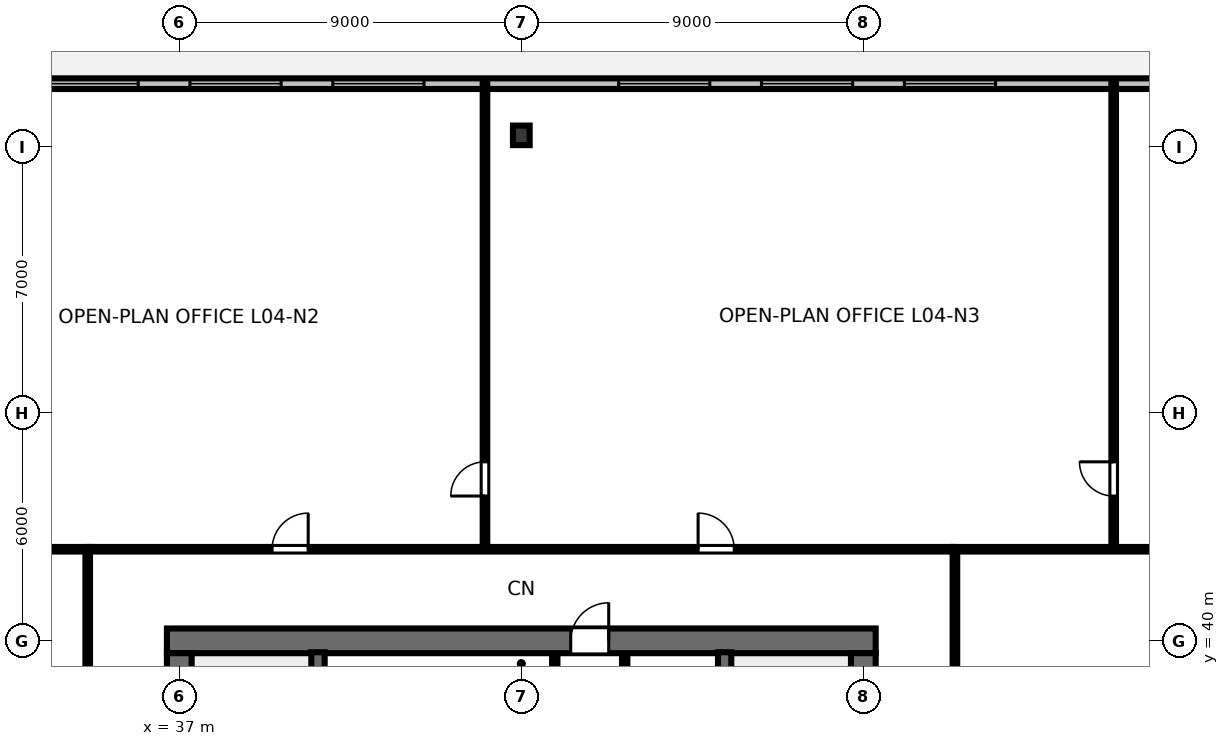
"""IFC4 building model, lengths in metres.
Left out: names, types, materials, properties, quantities, classifications, styles, units other than length and angle.
Written with IfcOpenShell. Run it as: python <this file> out.ifc"""

import sys

from ifc_helpers import new_model, si_unit, direction, frame, frame_2d, origin, origin_2d, place, context, subcontext, project, spatial, rectangle, i_section, extrude, element, fill, save


model = new_model("IFC4")
c1 = context("Model", 3, precision=1e-05, world=origin(), true_north=direction((0.0, 1.0)))
c2 = subcontext(c1, "Body", "Model", "MODEL_VIEW")
j1 = project(units=[si_unit("LENGTHUNIT", "METRE"), si_unit("PLANEANGLEUNIT", "RADIAN")], contexts=[c1])
p1 = place(None, origin())
s1 = spatial("IfcSite", under=j1, at=p1, CompositionType="ELEMENT")
p2 = place(p1, origin())
s2 = spatial("IfcBuilding", under=s1, at=p2, CompositionType="ELEMENT")
p3 = place(p2, frame((0.0, 0.0, 18.5)))
s3 = spatial("IfcBuildingStorey", under=s2, at=p3, CompositionType="ELEMENT", Elevation=18.5)
p4 = place(p3, frame((36.675, 40.0, 0.0), z_axis=(0.0, 0.0, 1.0), x_axis=(1.0, 0.0, 0.0)))
e1 = element("IfcWall", 1, at=p4, inside=s3, PredefinedType="SHEAR", context=c2, shape_type="SweptSolid", body=[
    extrude(rectangle(XDim=18.65, YDim=0.65, at=frame_2d((9.325, 0.0))), origin(), (0.0, 0.0, 1.0), 4.05),
])
p5 = place(p4, frame((10.625, 0.0, 0.0)))
e2 = element("IfcOpeningElement", 2, at=p5, cuts=e1, PredefinedType="OPENING", context=c2, shape_type="SweptSolid", body=[
    extrude(rectangle(XDim=1.0, YDim=2.15, at=frame_2d((0.5, 1.075))), frame((0.0, 0.335, 0.0), z_axis=(0.0, -1.0, 0.0), x_axis=(1.0, 0.0, 0.0)), (0.0, 0.0, 1.0), 0.67),
])
p6 = place(p3, frame((37.0, 24.325, 0.0), z_axis=(0.0, 0.0, 1.0), x_axis=(0.0, 1.0, 0.0)))
e3 = element("IfcWall", 3, at=p6, inside=s3, PredefinedType="SHEAR", context=c2, shape_type="SweptSolid", body=[
    extrude(rectangle(XDim=15.35, YDim=0.65, at=frame_2d((7.675, 0.0))), origin(), (0.0, 0.0, 1.0), 4.05),
])
p7 = place(p6, frame((5.2, 0.0, 0.0)))
e4 = element("IfcOpeningElement", 4, at=p7, cuts=e3, PredefinedType="OPENING", context=c2, shape_type="SweptSolid", body=[
    extrude(rectangle(XDim=1.15, YDim=2.15, at=frame_2d((0.575, 1.075))), frame((0.0, 0.335, 0.0), z_axis=(0.0, -1.0, 0.0), x_axis=(1.0, 0.0, 0.0)), (0.0, 0.0, 1.0), 0.67),
])
p8 = place(p3, frame((55.0, 24.325, 0.0), z_axis=(0.0, 0.0, 1.0), x_axis=(0.0, 1.0, 0.0)))
e5 = element("IfcWall", 5, at=p8, inside=s3, PredefinedType="SHEAR", context=c2, shape_type="SweptSolid", body=[
    extrude(rectangle(XDim=15.35, YDim=0.65, at=frame_2d((7.675, 0.0))), origin(), (0.0, 0.0, 1.0), 4.05),
])
p9 = place(p8, frame((5.2, 0.0, 0.0)))
e6 = element("IfcOpeningElement", 6, at=p9, cuts=e5, PredefinedType="OPENING", context=c2, shape_type="SweptSolid", body=[
    extrude(rectangle(XDim=1.15, YDim=2.15, at=frame_2d((0.575, 1.075))), frame((0.0, 0.335, 0.0), z_axis=(0.0, -1.0, 0.0), x_axis=(1.0, 0.0, 0.0)), (0.0, 0.0, 1.0), 0.67),
])
p10 = place(p3, frame((46.0, 53.3, 0.0), z_axis=(0.0, 0.0, 1.0), x_axis=(1.0, 0.0, 0.0)))
e7 = element("IfcColumn", 7, at=p10, inside=s3, PredefinedType="COLUMN", context=c2, shape_type="SweptSolid", body=[
    extrude(i_section(OverallWidth=0.439, OverallDepth=0.514, WebThickness=0.06, FlangeThickness=0.097, FilletRadius=0.025, at=origin_2d()), origin(), (0.0, 0.0, 1.0), 4.048),
])
p11 = place(p3, frame((71.54, 54.66, 0.0), z_axis=(0.0, 0.0, 1.0), x_axis=(-1.0, 0.0, 0.0)))
e8 = element("IfcWall", 8, at=p11, inside=s3, PredefinedType="STANDARD", context=c2, shape_type="SweptSolid", body=[
    extrude(rectangle(XDim=51.08, YDim=0.28, at=frame_2d((25.54, 0.0))), origin(), (0.0, 0.0, 1.0), 4.05),
])
p12 = place(p11, frame((5.54, 0.0, 0.85)))
e9 = element("IfcOpeningElement", 9, at=p12, cuts=e8, PredefinedType="OPENING", context=c2, shape_type="SweptSolid", body=[
    extrude(rectangle(XDim=2.4, YDim=2.4, at=frame_2d((1.2, 1.2))), frame((0.0, 0.15, 0.0), z_axis=(0.0, -1.0, 0.0), x_axis=(1.0, 0.0, 0.0)), (0.0, 0.0, 1.0), 0.3),
])
p13 = place(p11, frame((13.06, 0.0, 0.85)))
e10 = element("IfcOpeningElement", 10, at=p13, cuts=e8, PredefinedType="OPENING", context=c2, shape_type="SweptSolid", body=[
    extrude(rectangle(XDim=2.4, YDim=2.4, at=frame_2d((1.2, 1.2))), frame((0.0, 0.15, 0.0), z_axis=(0.0, -1.0, 0.0), x_axis=(1.0, 0.0, 0.0)), (0.0, 0.0, 1.0), 0.3),
])
p14 = place(p11, frame((16.82, 0.0, 0.85)))
e11 = element("IfcOpeningElement", 11, at=p14, cuts=e8, PredefinedType="OPENING", context=c2, shape_type="SweptSolid", body=[
    extrude(rectangle(XDim=2.4, YDim=2.4, at=frame_2d((1.2, 1.2))), frame((0.0, 0.15, 0.0), z_axis=(0.0, -1.0, 0.0), x_axis=(1.0, 0.0, 0.0)), (0.0, 0.0, 1.0), 0.3),
])
p15 = place(p11, frame((20.58, 0.0, 0.85)))
e12 = element("IfcOpeningElement", 12, at=p15, cuts=e8, PredefinedType="OPENING", context=c2, shape_type="SweptSolid", body=[
    extrude(rectangle(XDim=2.4, YDim=2.4, at=frame_2d((1.2, 1.2))), frame((0.0, 0.15, 0.0), z_axis=(0.0, -1.0, 0.0), x_axis=(1.0, 0.0, 0.0)), (0.0, 0.0, 1.0), 0.3),
])
p16 = place(p11, frame((28.1, 0.0, 0.85)))
e13 = element("IfcOpeningElement", 13, at=p16, cuts=e8, PredefinedType="OPENING", context=c2, shape_type="SweptSolid", body=[
    extrude(rectangle(XDim=2.4, YDim=2.4, at=frame_2d((1.2, 1.2))), frame((0.0, 0.15, 0.0), z_axis=(0.0, -1.0, 0.0), x_axis=(1.0, 0.0, 0.0)), (0.0, 0.0, 1.0), 0.3),
])
p17 = place(p11, frame((31.86, 0.0, 0.85)))
e14 = element("IfcOpeningElement", 14, at=p17, cuts=e8, PredefinedType="OPENING", context=c2, shape_type="SweptSolid", body=[
    extrude(rectangle(XDim=2.4, YDim=2.4, at=frame_2d((1.2, 1.2))), frame((0.0, 0.15, 0.0), z_axis=(0.0, -1.0, 0.0), x_axis=(1.0, 0.0, 0.0)), (0.0, 0.0, 1.0), 0.3),
])
p18 = place(p11, frame((35.62, 0.0, 0.85)))
e15 = element("IfcOpeningElement", 15, at=p18, cuts=e8, PredefinedType="OPENING", context=c2, shape_type="SweptSolid", body=[
    extrude(rectangle(XDim=2.4, YDim=2.4, at=frame_2d((1.2, 1.2))), frame((0.0, 0.15, 0.0), z_axis=(0.0, -1.0, 0.0), x_axis=(1.0, 0.0, 0.0)), (0.0, 0.0, 1.0), 0.3),
])
p19 = place(p11, frame((43.14, 0.0, 0.85)))
e16 = element("IfcOpeningElement", 16, at=p19, cuts=e8, PredefinedType="OPENING", context=c2, shape_type="SweptSolid", body=[
    extrude(rectangle(XDim=2.4, YDim=2.4, at=frame_2d((1.2, 1.2))), frame((0.0, 0.15, 0.0), z_axis=(0.0, -1.0, 0.0), x_axis=(1.0, 0.0, 0.0)), (0.0, 0.0, 1.0), 0.3),
])
for number, where, z_axis, x_axis in (
    (17, (40.65, 32.0, 0.0), (0.0, 0.0, 1.0), (0.0, 1.0, 0.0)),
    (18, (51.35, 32.0, 0.0), (0.0, 0.0, 1.0), (0.0, 1.0, 0.0)),
):
    element("IfcWall", number, at=place(p3, frame(where, z_axis=z_axis, x_axis=x_axis)), inside=s3, PredefinedType="SHEAR", context=c2, shape_type="SweptSolid", body=[
        extrude(rectangle(XDim=7.7, YDim=0.35, at=frame_2d((3.85, 0.0))), origin(), (0.0, 0.0, 1.0), 4.5),
    ])
p20 = place(p3, frame((46.88, 32.05, 0.0), z_axis=(0.0, 0.0, 1.0), x_axis=(0.0, 1.0, 0.0)))
e19 = element("IfcWall", 19, at=p20, inside=s3, PredefinedType="PARTITIONING", context=c2, shape_type="SweptSolid", body=[
    extrude(rectangle(XDim=7.6, YDim=0.14, at=frame_2d((3.8, 0.0))), origin(), (0.0, 0.0, 1.0), 4.05),
])
p21 = place(p20, frame((3.4, 0.0, 0.0)))
e20 = element("IfcOpeningElement", 20, at=p21, cuts=e19, PredefinedType="OPENING", context=c2, shape_type="SweptSolid", body=[
    extrude(rectangle(XDim=0.95, YDim=2.15, at=frame_2d((0.475, 1.075))), frame((0.0, 0.08, 0.0), z_axis=(0.0, -1.0, 0.0), x_axis=(1.0, 0.0, 0.0)), (0.0, 0.0, 1.0), 0.16),
])
p22 = place(p3, frame((48.72, 32.05, 0.0), z_axis=(0.0, 0.0, 1.0), x_axis=(0.0, 1.0, 0.0)))
e21 = element("IfcWall", 21, at=p22, inside=s3, PredefinedType="PARTITIONING", context=c2, shape_type="SweptSolid", body=[
    extrude(rectangle(XDim=7.6, YDim=0.14, at=frame_2d((3.8, 0.0))), origin(), (0.0, 0.0, 1.0), 4.05),
])
p23 = place(p22, frame((0.8, 0.0, 0.0)))
e22 = element("IfcOpeningElement", 22, at=p23, cuts=e21, PredefinedType="OPENING", context=c2, shape_type="SweptSolid", body=[
    extrude(rectangle(XDim=0.9, YDim=2.15, at=frame_2d((0.45, 1.075))), frame((0.0, 0.08, 0.0), z_axis=(0.0, -1.0, 0.0), x_axis=(1.0, 0.0, 0.0)), (0.0, 0.0, 1.0), 0.16),
])
p24 = place(p22, frame((3.35, 0.0, 0.0)))
e23 = element("IfcOpeningElement", 23, at=p24, cuts=e21, PredefinedType="OPENING", context=c2, shape_type="SweptSolid", body=[
    extrude(rectangle(XDim=0.9, YDim=2.15, at=frame_2d((0.45, 1.075))), frame((0.0, 0.08, 0.0), z_axis=(0.0, -1.0, 0.0), x_axis=(1.0, 0.0, 0.0)), (0.0, 0.0, 1.0), 0.16),
])
p25 = place(p22, frame((5.9, 0.0, 0.0)))
e24 = element("IfcOpeningElement", 24, at=p25, cuts=e21, PredefinedType="OPENING", context=c2, shape_type="SweptSolid", body=[
    extrude(rectangle(XDim=0.92, YDim=2.15, at=frame_2d((0.46, 1.075))), frame((0.0, 0.08, 0.0), z_axis=(0.0, -1.0, 0.0), x_axis=(1.0, 0.0, 0.0)), (0.0, 0.0, 1.0), 0.16),
])
p26 = place(p3, frame((45.044, 42.41, 0.0), z_axis=(0.0, 0.0, 1.0), x_axis=(0.0, 1.0, 0.0)))
e25 = element("IfcWall", 25, at=p26, inside=s3, PredefinedType="PARTITIONING", context=c2, shape_type="SweptSolid", body=[
    extrude(rectangle(XDim=12.25, YDim=0.12, at=frame_2d((6.125, 0.0))), origin(), (0.0, 0.0, 1.0), 2.89),
])
p27 = place(p26, frame((1.4, 0.0, 0.0)))
e26 = element("IfcOpeningElement", 26, at=p27, cuts=e25, PredefinedType="OPENING", context=c2, shape_type="SweptSolid", body=[
    extrude(rectangle(XDim=0.9, YDim=2.15, at=frame_2d((0.45, 1.075))), frame((0.0, 0.07, 0.0), z_axis=(0.0, -1.0, 0.0), x_axis=(1.0, 0.0, 0.0)), (0.0, 0.0, 1.0), 0.14),
])
p28 = place(p3, frame((61.588, 42.41, 0.0), z_axis=(0.0, 0.0, 1.0), x_axis=(0.0, 1.0, 0.0)))
e27 = element("IfcWall", 27, at=p28, inside=s3, PredefinedType="PARTITIONING", context=c2, shape_type="SweptSolid", body=[
    extrude(rectangle(XDim=12.25, YDim=0.12, at=frame_2d((6.125, 0.0))), origin(), (0.0, 0.0, 1.0), 2.89),
])
p29 = place(p28, frame((1.4, 0.0, 0.0)))
e28 = element("IfcOpeningElement", 28, at=p29, cuts=e27, PredefinedType="OPENING", context=c2, shape_type="SweptSolid", body=[
    extrude(rectangle(XDim=0.9, YDim=2.15, at=frame_2d((0.45, 1.075))), frame((0.0, 0.07, 0.0), z_axis=(0.0, -1.0, 0.0), x_axis=(1.0, 0.0, 0.0)), (0.0, 0.0, 1.0), 0.14),
])
p30 = place(p3, frame((34.65, 42.41, 0.0), z_axis=(0.0, 0.0, 1.0), x_axis=(1.0, 0.0, 0.0)))
e29 = element("IfcWall", 29, at=p30, inside=s3, PredefinedType="PARTITIONING", context=c2, shape_type="SweptSolid", body=[
    extrude(rectangle(XDim=22.7, YDim=0.12, at=frame_2d((11.35, 0.0))), origin(), (0.0, 0.0, 1.0), 2.89),
])
p31 = place(p30, frame((4.792, 0.0, 0.0)))
e30 = element("IfcOpeningElement", 30, at=p31, cuts=e29, PredefinedType="OPENING", context=c2, shape_type="SweptSolid", body=[
    extrude(rectangle(XDim=0.95, YDim=2.15, at=frame_2d((0.475, 1.075))), frame((0.0, 0.07, 0.0), z_axis=(0.0, -1.0, 0.0), x_axis=(1.0, 0.0, 0.0)), (0.0, 0.0, 1.0), 0.14),
])
p32 = place(p30, frame((16.002, 0.0, 0.0)))
e31 = element("IfcOpeningElement", 31, at=p32, cuts=e29, PredefinedType="OPENING", context=c2, shape_type="SweptSolid", body=[
    extrude(rectangle(XDim=0.95, YDim=2.15, at=frame_2d((0.475, 1.075))), frame((0.0, 0.07, 0.0), z_axis=(0.0, -1.0, 0.0), x_axis=(1.0, 0.0, 0.0)), (0.0, 0.0, 1.0), 0.14),
])
p33 = place(p3, frame((34.59, 21.65, 0.0), z_axis=(0.0, 0.0, 1.0), x_axis=(0.0, 1.0, 0.0)))
e32 = element("IfcWall", 32, at=p33, inside=s3, PredefinedType="PARTITIONING", context=c2, shape_type="SweptSolid", body=[
    extrude(rectangle(XDim=20.7, YDim=0.12, at=frame_2d((10.35, 0.0))), origin(), (0.0, 0.0, 1.0), 2.89),
])
p34 = place(p33, frame((2.105, 0.0, 0.0)))
e33 = element("IfcOpeningElement", 33, at=p34, cuts=e32, PredefinedType="OPENING", context=c2, shape_type="SweptSolid", body=[
    extrude(rectangle(XDim=0.95, YDim=2.15, at=frame_2d((0.475, 1.075))), frame((0.0, 0.07, 0.0), z_axis=(0.0, -1.0, 0.0), x_axis=(1.0, 0.0, 0.0)), (0.0, 0.0, 1.0), 0.14),
])
p35 = place(p33, frame((7.369, 0.0, 0.0)))
e34 = element("IfcOpeningElement", 34, at=p35, cuts=e32, PredefinedType="OPENING", context=c2, shape_type="SweptSolid", body=[
    extrude(rectangle(XDim=0.95, YDim=2.15, at=frame_2d((0.475, 1.075))), frame((0.0, 0.07, 0.0), z_axis=(0.0, -1.0, 0.0), x_axis=(1.0, 0.0, 0.0)), (0.0, 0.0, 1.0), 0.14),
])
p36 = place(p33, frame((15.139, 0.0, 0.0)))
e35 = element("IfcOpeningElement", 35, at=p36, cuts=e32, PredefinedType="OPENING", context=c2, shape_type="SweptSolid", body=[
    extrude(rectangle(XDim=0.95, YDim=2.15, at=frame_2d((0.475, 1.075))), frame((0.0, 0.07, 0.0), z_axis=(0.0, -1.0, 0.0), x_axis=(1.0, 0.0, 0.0)), (0.0, 0.0, 1.0), 0.14),
])
p37 = place(p3, frame((57.41, 21.65, 0.0), z_axis=(0.0, 0.0, 1.0), x_axis=(0.0, 1.0, 0.0)))
e36 = element("IfcWall", 36, at=p37, inside=s3, PredefinedType="PARTITIONING", context=c2, shape_type="SweptSolid", body=[
    extrude(rectangle(XDim=20.7, YDim=0.12, at=frame_2d((10.35, 0.0))), origin(), (0.0, 0.0, 1.0), 2.89),
])
p38 = place(p37, frame((9.875, 0.0, 0.0)))
e37 = element("IfcOpeningElement", 37, at=p38, cuts=e36, PredefinedType="OPENING", context=c2, shape_type="SweptSolid", body=[
    extrude(rectangle(XDim=0.95, YDim=2.15, at=frame_2d((0.475, 1.075))), frame((0.0, 0.07, 0.0), z_axis=(0.0, -1.0, 0.0), x_axis=(1.0, 0.0, 0.0)), (0.0, 0.0, 1.0), 0.14),
])
for number, where, z_axis, x_axis in (
    (38, (34.65, 42.41, 0.0), (0.0, 0.0, 1.0), (-1.0, 0.0, 0.0)),
    (39, (57.35, 42.41, 0.0), (0.0, 0.0, 1.0), (1.0, 0.0, 0.0)),
):
    element("IfcWall", number, at=place(p3, frame(where, z_axis=z_axis, x_axis=x_axis)), inside=s3, PredefinedType="PARTITIONING", context=c2, shape_type="SweptSolid", body=[
        extrude(rectangle(XDim=18.71, YDim=0.12, at=frame_2d((9.355, 0.0))), origin(), (0.0, 0.0, 1.0), 2.89),
    ])
p39 = place(p13, origin())
e40 = element("IfcWindow", 40, at=p39, inside=s3, PartitioningType="SINGLE_PANEL", PredefinedType="WINDOW", context=c2, shape_type="SweptSolid", body=[
    extrude(rectangle(XDim=2.4, YDim=2.4, at=frame_2d((1.2, 1.2))), frame((0.0, 0.03, 0.0), z_axis=(0.0, -1.0, 0.0), x_axis=(1.0, 0.0, 0.0)), (0.0, 0.0, 1.0), 0.06),
])
fill(e10, e40)
p40 = place(p14, origin())
e41 = element("IfcWindow", 41, at=p40, inside=s3, PartitioningType="SINGLE_PANEL", PredefinedType="WINDOW", context=c2, shape_type="SweptSolid", body=[
    extrude(rectangle(XDim=2.4, YDim=2.4, at=frame_2d((1.2, 1.2))), frame((0.0, 0.03, 0.0), z_axis=(0.0, -1.0, 0.0), x_axis=(1.0, 0.0, 0.0)), (0.0, 0.0, 1.0), 0.06),
])
fill(e11, e41)
p41 = place(p15, origin())
e42 = element("IfcWindow", 42, at=p41, inside=s3, PartitioningType="SINGLE_PANEL", PredefinedType="WINDOW", context=c2, shape_type="SweptSolid", body=[
    extrude(rectangle(XDim=2.4, YDim=2.4, at=frame_2d((1.2, 1.2))), frame((0.0, 0.03, 0.0), z_axis=(0.0, -1.0, 0.0), x_axis=(1.0, 0.0, 0.0)), (0.0, 0.0, 1.0), 0.06),
])
fill(e12, e42)
p42 = place(p16, origin())
e43 = element("IfcWindow", 43, at=p42, inside=s3, PartitioningType="SINGLE_PANEL", PredefinedType="WINDOW", context=c2, shape_type="SweptSolid", body=[
    extrude(rectangle(XDim=2.4, YDim=2.4, at=frame_2d((1.2, 1.2))), frame((0.0, 0.03, 0.0), z_axis=(0.0, -1.0, 0.0), x_axis=(1.0, 0.0, 0.0)), (0.0, 0.0, 1.0), 0.06),
])
fill(e13, e43)
p43 = place(p17, origin())
e44 = element("IfcWindow", 44, at=p43, inside=s3, PartitioningType="SINGLE_PANEL", PredefinedType="WINDOW", context=c2, shape_type="SweptSolid", body=[
    extrude(rectangle(XDim=2.4, YDim=2.4, at=frame_2d((1.2, 1.2))), frame((0.0, 0.03, 0.0), z_axis=(0.0, -1.0, 0.0), x_axis=(1.0, 0.0, 0.0)), (0.0, 0.0, 1.0), 0.06),
])
fill(e14, e44)
p44 = place(p18, origin())
e45 = element("IfcWindow", 45, at=p44, inside=s3, PartitioningType="SINGLE_PANEL", PredefinedType="WINDOW", context=c2, shape_type="SweptSolid", body=[
    extrude(rectangle(XDim=2.4, YDim=2.4, at=frame_2d((1.2, 1.2))), frame((0.0, 0.03, 0.0), z_axis=(0.0, -1.0, 0.0), x_axis=(1.0, 0.0, 0.0)), (0.0, 0.0, 1.0), 0.06),
])
fill(e15, e45)
p45 = place(p5, origin())
e46 = element("IfcDoor", 46, at=p45, inside=s3, OperationType="SINGLE_SWING_RIGHT", PredefinedType="DOOR", context=c2, shape_type="SweptSolid", body=[
    extrude(rectangle(XDim=1.0, YDim=2.15, at=frame_2d((0.5, 1.075))), frame((0.0, 0.025, 0.0), z_axis=(0.0, -1.0, 0.0), x_axis=(1.0, 0.0, 0.0)), (0.0, 0.0, 1.0), 0.05),
])
fill(e2, e46)
p46 = place(p27, origin())
e47 = element("IfcDoor", 47, at=p46, inside=s3, OperationType="SINGLE_SWING_LEFT", PredefinedType="DOOR", context=c2, shape_type="SweptSolid", body=[
    extrude(rectangle(XDim=0.9, YDim=2.15, at=frame_2d((0.45, 1.075))), frame((0.0, 0.025, 0.0), z_axis=(0.0, -1.0, 0.0), x_axis=(1.0, 0.0, 0.0)), (0.0, 0.0, 1.0), 0.05),
])
fill(e26, e47)
p47 = place(p29, origin())
e48 = element("IfcDoor", 48, at=p47, inside=s3, OperationType="SINGLE_SWING_RIGHT", PredefinedType="DOOR", context=c2, shape_type="SweptSolid", body=[
    extrude(rectangle(XDim=0.9, YDim=2.15, at=frame_2d((0.45, 1.075))), frame((0.0, 0.025, 0.0), z_axis=(0.0, -1.0, 0.0), x_axis=(1.0, 0.0, 0.0)), (0.0, 0.0, 1.0), 0.05),
])
fill(e28, e48)
p48 = place(p31, origin())
e49 = element("IfcDoor", 49, at=p48, inside=s3, OperationType="SINGLE_SWING_RIGHT", PredefinedType="DOOR", context=c2, shape_type="SweptSolid", body=[
    extrude(rectangle(XDim=0.95, YDim=2.15, at=frame_2d((0.475, 1.075))), frame((0.0, 0.025, 0.0), z_axis=(0.0, -1.0, 0.0), x_axis=(1.0, 0.0, 0.0)), (0.0, 0.0, 1.0), 0.05),
])
fill(e30, e49)
p49 = place(p32, origin())
e50 = element("IfcDoor", 50, at=p49, inside=s3, OperationType="SINGLE_SWING_LEFT", PredefinedType="DOOR", context=c2, shape_type="SweptSolid", body=[
    extrude(rectangle(XDim=0.95, YDim=2.15, at=frame_2d((0.475, 1.075))), frame((0.0, 0.025, 0.0), z_axis=(0.0, -1.0, 0.0), x_axis=(1.0, 0.0, 0.0)), (0.0, 0.0, 1.0), 0.05),
])
fill(e31, e50)
save(model, sys.argv[1])
